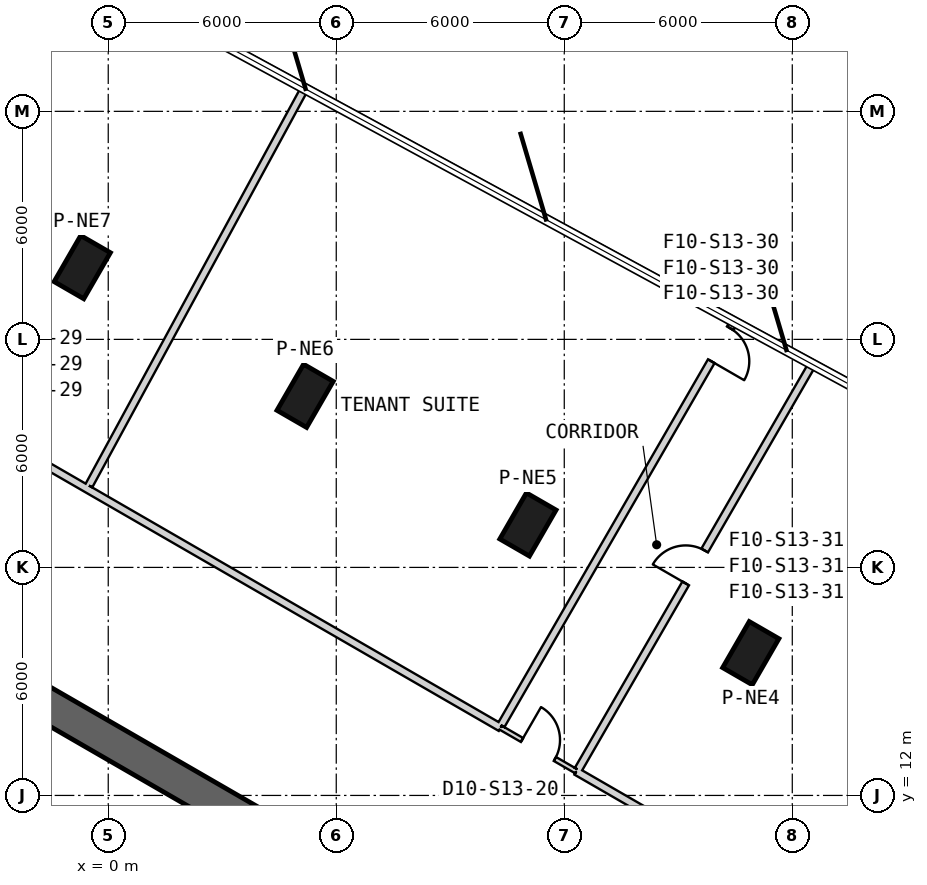
"""IFC4 building model, lengths in metres.
Left out: names, types, materials, properties, quantities, classifications, styles, units other than length and angle.
Written with IfcOpenShell. Run it as: python <this file> out.ifc"""

import sys

from ifc_helpers import new_model, si_unit, direction, frame, frame_2d, origin, origin_2d, place, context, subcontext, project, spatial, rectangle, extrude, element, fill, save


model = new_model("IFC4")
c1 = context("Model", 3, precision=1e-05, world=origin(), true_north=direction((0.0, 1.0)))
c2 = subcontext(c1, "Body", "Model", "MODEL_VIEW")
j1 = project(units=[si_unit("LENGTHUNIT", "METRE"), si_unit("PLANEANGLEUNIT", "RADIAN")], contexts=[c1])
p1 = place(None, origin())
s1 = spatial("IfcSite", under=j1, at=p1, CompositionType="ELEMENT")
p2 = place(p1, origin())
s2 = spatial("IfcBuilding", under=s1, at=p2, CompositionType="ELEMENT")
p3 = place(p2, frame((0.0, 0.0, 217.2)))
s3 = spatial("IfcBuildingStorey", under=s2, at=p3, CompositionType="ELEMENT", Elevation=217.2)
for number, where, z_axis, x_axis in (
    (1, (16.908, 15.743, 0.0), (0.0, 0.0, 1.0), (0.5, 0.866, 0.0)),
    (2, (11.044, 19.129, 0.0), (0.0, 0.0, 1.0), (0.5, 0.866, 0.0)),
    (3, (5.18, 22.514, 0.0), (0.0, 0.0, 1.0), (0.5, 0.866, 0.0)),
    (4, (-0.684, 25.9, 0.0), (0.0, 0.0, 1.0), (0.5, 0.866, 0.0)),
):
    element("IfcColumn", number, at=place(p3, frame(where, z_axis=z_axis, x_axis=x_axis)), inside=s3, PredefinedType="COLUMN", context=c2, shape_type="SweptSolid", body=[
        extrude(rectangle(XDim=1.4, YDim=0.9, at=origin_2d()), origin(), (0.0, 0.0, 1.0), 4.0),
    ])
p4 = place(p3, frame((19.475, 2.208, 0.0), z_axis=(0.0, 0.0, 1.0), x_axis=(-0.866028369851, 0.499994862586, 0.0)))
e5 = element("IfcWall", 5, at=p4, inside=s3, PredefinedType="SHEAR", context=c2, shape_type="SweptSolid", body=[
    extrude(rectangle(XDim=31.523, YDim=0.9, at=frame_2d((15.762, 0.0))), origin(), (0.0, 0.0, 1.0), 4.0),
])
p5 = place(p4, frame((7.062, 0.0, 0.0)))
e6 = element("IfcOpeningElement", 6, at=p5, cuts=e5, PredefinedType="OPENING", context=c2, shape_type="SweptSolid", body=[
    extrude(rectangle(XDim=1.2, YDim=2.4, at=frame_2d((0.6, 1.2))), frame((0.0, 0.46, 0.0), z_axis=(0.0, -1.0, 0.0), x_axis=(1.0, 0.0, 0.0)), (0.0, 0.0, 1.0), 0.92),
])
p6 = place(p4, frame((3.612, 0.0, 0.0)))
e7 = element("IfcOpeningElement", 7, at=p6, cuts=e5, PredefinedType="OPENING", context=c2, shape_type="SweptSolid", body=[
    extrude(rectangle(XDim=1.2, YDim=2.4, at=frame_2d((0.6, 1.2))), frame((0.0, 0.46, 0.0), z_axis=(0.0, -1.0, 0.0), x_axis=(1.0, 0.0, 0.0)), (0.0, 0.0, 1.0), 0.92),
])
p7 = place(p4, frame((26.712, 0.0, 0.0)))
e8 = element("IfcOpeningElement", 8, at=p7, cuts=e5, PredefinedType="OPENING", context=c2, shape_type="SweptSolid", body=[
    extrude(rectangle(XDim=1.2, YDim=2.4, at=frame_2d((0.6, 1.2))), frame((0.0, 0.46, 0.0), z_axis=(0.0, -1.0, 0.0), x_axis=(1.0, 0.0, 0.0)), (0.0, 0.0, 1.0), 0.92),
])
p8 = place(p3, frame((-4.296, 11.66, 0.0), z_axis=(0.0, 0.0, 1.0), x_axis=(0.866027389382, -0.499996560828, 0.0)))
e9 = element("IfcWall", 9, at=p8, inside=s3, PredefinedType="PARTITIONING", context=c2, shape_type="SweptSolid", body=[
    extrude(rectangle(XDim=3.778, YDim=0.2, at=frame_2d((1.889, 0.0))), origin(), (0.0, 0.0, 1.0), 3.7),
])
p9 = place(p3, frame((10.325, 13.784, 0.0), z_axis=(0.0, 0.0, 1.0), x_axis=(0.86602648383, -0.499998129301, 0.0)))
e10 = element("IfcWall", 10, at=p9, inside=s3, PredefinedType="PARTITIONING", context=c2, shape_type="SweptSolid", body=[
    extrude(rectangle(XDim=2.3, YDim=0.12, at=frame_2d((1.15, 0.0))), origin(), (0.0, 0.0, 1.0), 3.7),
])
p10 = place(p9, frame((0.65, 0.0, 0.0)))
e11 = element("IfcOpeningElement", 11, at=p10, cuts=e10, PredefinedType="OPENING", context=c2, shape_type="SweptSolid", body=[
    extrude(rectangle(XDim=1.0, YDim=2.1, at=frame_2d((0.5, 1.05))), frame((0.0, 0.07, 0.0), z_axis=(0.0, -1.0, 0.0), x_axis=(1.0, 0.0, 0.0)), (0.0, 0.0, 1.0), 0.14),
])
p11 = place(p3, frame((23.119, 6.398, 0.0), z_axis=(0.0, 0.0, 1.0), x_axis=(-0.866027821991, 0.499995811521, 0.0)))
e12 = element("IfcWall", 12, at=p11, inside=s3, PredefinedType="PARTITIONING", context=c2, shape_type="SweptSolid", body=[
    extrude(rectangle(XDim=12.473, YDim=0.2, at=frame_2d((6.236, 0.0))), origin(), (0.0, 0.0, 1.0), 2.88),
])
p12 = place(p3, frame((10.325, 13.784, 0.0), z_axis=(0.0, 0.0, 1.0), x_axis=(-0.866025119466, 0.500000492453, 0.0)))
e13 = element("IfcWall", 13, at=p12, inside=s3, PredefinedType="PARTITIONING", context=c2, shape_type="SweptSolid", body=[
    extrude(rectangle(XDim=18.673, YDim=0.2, at=frame_2d((9.336, 0.0))), origin(), (0.0, 0.0, 1.0), 2.88),
])
p13 = place(p12, frame((15.118, 0.0, 0.0)))
e14 = element("IfcOpeningElement", 14, at=p13, cuts=e13, PredefinedType="OPENING", context=c2, shape_type="SweptSolid", body=[
    extrude(rectangle(XDim=1.0, YDim=2.1, at=frame_2d((0.5, 1.05))), frame((0.0, 0.11, 0.0), z_axis=(0.0, -1.0, 0.0), x_axis=(1.0, 0.0, 0.0)), (0.0, 0.0, 1.0), 0.22),
])
p14 = place(p3, frame((16.469, 24.464, 0.0), z_axis=(0.0, 0.0, 1.0), x_axis=(-0.499989616998, -0.866031398331, 0.0)))
e15 = element("IfcWall", 15, at=p14, inside=s3, PredefinedType="PARTITIONING", context=c2, shape_type="SweptSolid", body=[
    extrude(rectangle(XDim=12.261, YDim=0.2, at=frame_2d((6.13, 0.0))), origin(), (0.0, 0.0, 1.0), 3.7),
])
p15 = place(p14, frame((0.2, 0.0, 0.0)))
e16 = element("IfcOpeningElement", 16, at=p15, cuts=e15, PredefinedType="OPENING", context=c2, shape_type="SweptSolid", body=[
    extrude(rectangle(XDim=1.0, YDim=2.1, at=frame_2d((0.5, 1.05))), frame((0.0, 0.11, 0.0), z_axis=(0.0, -1.0, 0.0), x_axis=(1.0, 0.0, 0.0)), (0.0, 0.0, 1.0), 0.22),
])
p16 = place(p3, frame((12.365, 12.676, 0.0), z_axis=(0.0, 0.0, 1.0), x_axis=(0.500008872635, 0.866020281106, 0.0)))
e17 = element("IfcWall", 17, at=p16, inside=s3, PredefinedType="PARTITIONING", context=c2, shape_type="SweptSolid", body=[
    extrude(rectangle(XDim=12.322, YDim=0.2, at=frame_2d((6.161, 0.0))), origin(), (0.0, 0.0, 1.0), 3.7),
])
p17 = place(p16, frame((5.661, 0.0, 0.0)))
e18 = element("IfcOpeningElement", 18, at=p17, cuts=e17, PredefinedType="OPENING", context=c2, shape_type="SweptSolid", body=[
    extrude(rectangle(XDim=1.0, YDim=2.1, at=frame_2d((0.5, 1.05))), frame((0.0, 0.11, 0.0), z_axis=(0.0, -1.0, 0.0), x_axis=(1.0, 0.0, 0.0)), (0.0, 0.0, 1.0), 0.22),
])
p18 = place(p3, frame((-0.508, 20.154, 0.0), z_axis=(0.0, 0.0, 1.0), x_axis=(0.477264499804, 0.878759692536, 0.0)))
e19 = element("IfcWall", 19, at=p18, inside=s3, PredefinedType="PARTITIONING", context=c2, shape_type="SweptSolid", body=[
    extrude(rectangle(XDim=11.89, YDim=0.2, at=frame_2d((5.945, 0.0))), origin(), (0.0, 0.0, 1.0), 2.98),
])
p19 = place(p10, origin())
e20 = element("IfcDoor", 20, at=p19, inside=s3, OperationType="SINGLE_SWING_LEFT", PredefinedType="NOTDEFINED", context=c2, shape_type="SweptSolid", body=[
    extrude(rectangle(XDim=1.0, YDim=2.1, at=frame_2d((0.5, 1.05))), frame((0.0, 0.025, 0.0), z_axis=(0.0, -1.0, 0.0), x_axis=(1.0, 0.0, 0.0)), (0.0, 0.0, 1.0), 0.05),
])
fill(e11, e20)
p20 = place(p15, origin())
e21 = element("IfcDoor", 21, at=p20, inside=s3, OperationType="SINGLE_SWING_LEFT", PredefinedType="USERDEFINED", context=c2, shape_type="SweptSolid", body=[
    extrude(rectangle(XDim=1.0, YDim=2.1, at=frame_2d((0.5, 1.05))), frame((0.0, 0.025, 0.0), z_axis=(0.0, -1.0, 0.0), x_axis=(1.0, 0.0, 0.0)), (0.0, 0.0, 1.0), 0.05),
])
fill(e16, e21)
p21 = place(p17, origin())
e22 = element("IfcDoor", 22, at=p21, inside=s3, OperationType="SINGLE_SWING_LEFT", PredefinedType="USERDEFINED", context=c2, shape_type="SweptSolid", body=[
    extrude(rectangle(XDim=1.0, YDim=2.1, at=frame_2d((0.5, 1.05))), frame((0.0, 0.025, 0.0), z_axis=(0.0, -1.0, 0.0), x_axis=(1.0, 0.0, 0.0)), (0.0, 0.0, 1.0), 0.05),
])
fill(e18, e22)
save(model, sys.argv[1])
